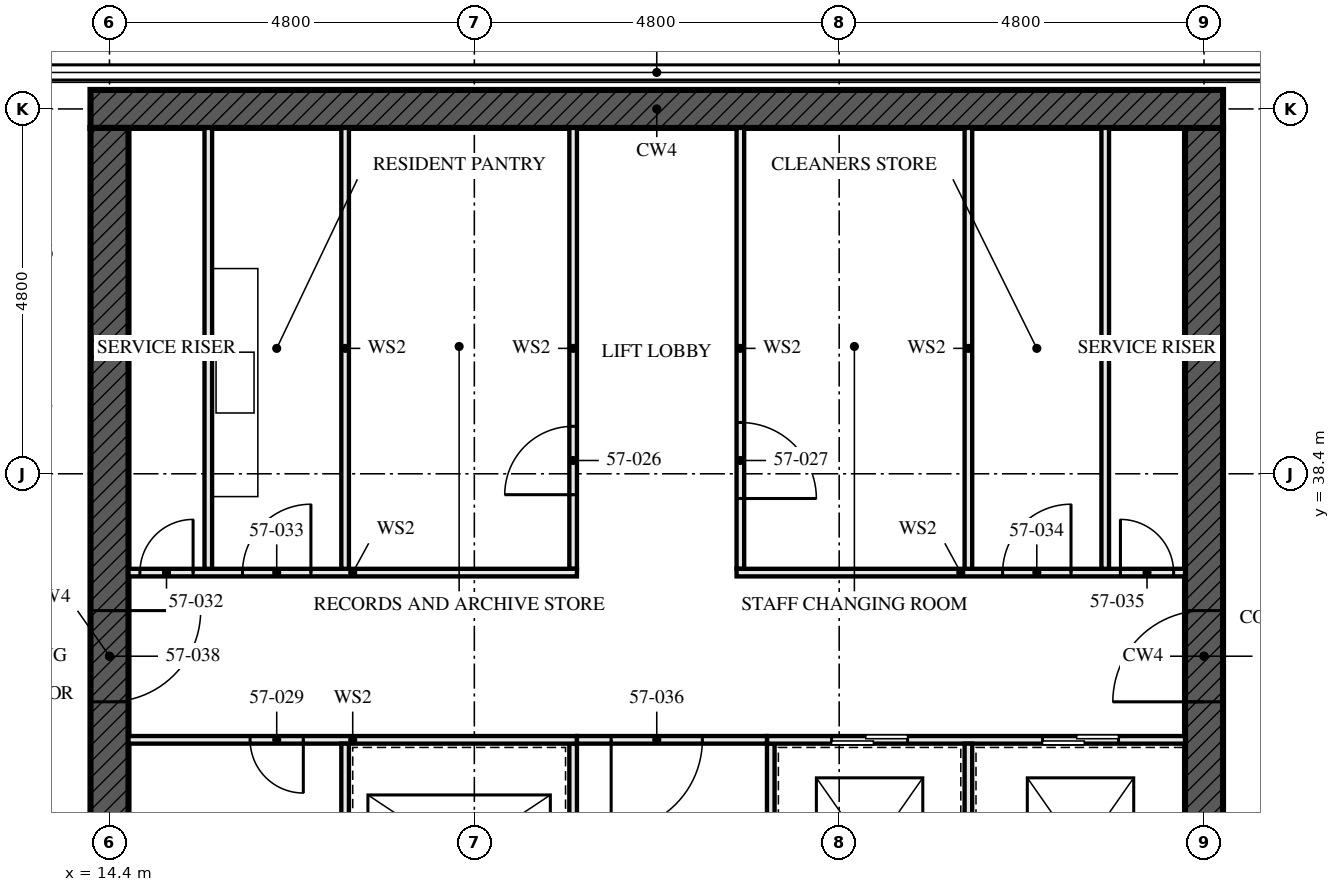
"""IFC4 building model, lengths in metres.
Left out: names, types, materials, properties, quantities, classifications, styles, units other than length and angle.
Written with IfcOpenShell. Run it as: python <this file> out.ifc"""

import sys

from ifc_helpers import new_model, si_unit, direction, frame, frame_2d, origin, place, context, subcontext, project, spatial, rectangle, extrude, element, fill, save


model = new_model("IFC4")
c1 = context("Model", 3, precision=1e-05, world=origin(), true_north=direction((0.0, 1.0)))
c2 = subcontext(c1, "Body", "Model", "MODEL_VIEW")
j1 = project(units=[si_unit("LENGTHUNIT", "METRE"), si_unit("PLANEANGLEUNIT", "RADIAN")], contexts=[c1])
p1 = place(None, origin())
s1 = spatial("IfcSite", under=j1, at=p1, CompositionType="ELEMENT")
p2 = place(p1, origin())
s2 = spatial("IfcBuilding", under=s1, at=p2, CompositionType="ELEMENT")
p3 = place(p2, frame((0.0, 0.0, 208.5)))
s3 = spatial("IfcBuildingStorey", under=s2, at=p3, CompositionType="ELEMENT", Elevation=208.5)
p4 = place(p3, frame((29.05, 43.2, -0.17), z_axis=(0.0, 0.0, 1.0), x_axis=(-1.0, 0.0, 0.0)))
e1 = element("IfcWall", 1, at=p4, inside=s3, PredefinedType="SHEAR", context=c2, shape_type="SweptSolid", body=[
    extrude(rectangle(XDim=14.9, YDim=0.5, at=frame_2d((7.45, 0.0))), origin(), (0.0, 0.0, 1.0), 3.5),
])
p5 = place(p3, frame((14.4, 42.95, -0.17), z_axis=(0.0, 0.0, 1.0), x_axis=(0.0, -1.0, 0.0)))
e2 = element("IfcWall", 2, at=p5, inside=s3, PredefinedType="SHEAR", context=c2, shape_type="SweptSolid", body=[
    extrude(rectangle(XDim=13.9, YDim=0.5, at=frame_2d((6.95, 0.0))), origin(), (0.0, 0.0, 1.0), 3.5),
])
p6 = place(p5, frame((6.35, 0.0, 0.17)))
e3 = element("IfcOpeningElement", 3, at=p6, cuts=e2, PredefinedType="OPENING", context=c2, shape_type="SweptSolid", body=[
    extrude(rectangle(XDim=1.2, YDim=2.1, at=frame_2d((0.6, 1.05))), frame((0.0, 0.26, 0.0), z_axis=(0.0, -1.0, 0.0), x_axis=(1.0, 0.0, 0.0)), (0.0, 0.0, 1.0), 0.521),
])
p7 = place(p3, frame((28.8, 29.05, -0.17), z_axis=(0.0, 0.0, 1.0), x_axis=(0.0, 1.0, 0.0)))
e4 = element("IfcWall", 4, at=p7, inside=s3, PredefinedType="SHEAR", context=c2, shape_type="SweptSolid", body=[
    extrude(rectangle(XDim=13.9, YDim=0.5, at=frame_2d((6.95, 0.0))), origin(), (0.0, 0.0, 1.0), 3.5),
])
p8 = place(p7, frame((6.35, 0.0, 0.17)))
e5 = element("IfcOpeningElement", 5, at=p8, cuts=e4, PredefinedType="OPENING", context=c2, shape_type="SweptSolid", body=[
    extrude(rectangle(XDim=1.2, YDim=2.1, at=frame_2d((0.6, 1.05))), frame((0.0, 0.26, 0.0), z_axis=(0.0, -1.0, 0.0), x_axis=(1.0, 0.0, 0.0)), (0.0, 0.0, 1.0), 0.521),
])
for number, where, z_axis, x_axis in (
    (6, (15.7, 37.15, 0.0), (0.0, 0.0, 1.0), (0.0, 1.0, 0.0)),
    (7, (27.5, 37.15, 0.0), (0.0, 0.0, 1.0), (0.0, 1.0, 0.0)),
):
    element("IfcWall", number, at=place(p3, frame(where, z_axis=z_axis, x_axis=x_axis)), inside=s3, PredefinedType="SOLIDWALL", context=c2, shape_type="SweptSolid", body=[
        extrude(rectangle(XDim=5.8, YDim=0.1, at=frame_2d((2.9, 0.0))), origin(), (0.0, 0.0, 1.0), 3.33),
    ])
p9 = place(p3, frame((20.5, 29.05, 0.0), z_axis=(0.0, 0.0, 1.0), x_axis=(0.0, 1.0, 0.0)))
e8 = element("IfcWall", 8, at=p9, inside=s3, PredefinedType="SOLIDWALL", context=c2, shape_type="SweptSolid", body=[
    extrude(rectangle(XDim=5.8, YDim=0.1, at=frame_2d((2.9, 0.0))), origin(), (0.0, 0.0, 1.0), 3.33),
])
p10 = place(p9, frame((0.8, 0.0, 0.0)))
e9 = element("IfcOpeningElement", 9, at=p10, cuts=e8, PredefinedType="OPENING", context=c2, shape_type="SweptSolid", body=[
    extrude(rectangle(XDim=1.1, YDim=2.3, at=frame_2d((0.55, 1.15))), frame((0.0, 0.061, 0.0), z_axis=(0.0, -1.0, 0.0), x_axis=(1.0, 0.0, 0.0)), (0.0, 0.0, 1.0), 0.121),
])
p11 = place(p9, frame((3.775, 0.0, 0.0)))
e10 = element("IfcOpeningElement", 10, at=p11, cuts=e8, PredefinedType="OPENING", context=c2, shape_type="SweptSolid", body=[
    extrude(rectangle(XDim=1.1, YDim=2.3, at=frame_2d((0.55, 1.15))), frame((0.0, 0.061, 0.0), z_axis=(0.0, -1.0, 0.0), x_axis=(1.0, 0.0, 0.0)), (0.0, 0.0, 1.0), 0.121),
])
p12 = place(p3, frame((20.5, 37.15, 0.0), z_axis=(0.0, 0.0, 1.0), x_axis=(0.0, 1.0, 0.0)))
e11 = element("IfcWall", 11, at=p12, inside=s3, PredefinedType="SOLIDWALL", context=c2, shape_type="SweptSolid", body=[
    extrude(rectangle(XDim=5.8, YDim=0.1, at=frame_2d((2.9, 0.0))), origin(), (0.0, 0.0, 1.0), 3.33),
])
p13 = place(p12, frame((0.975, 0.0, 0.0)))
e12 = element("IfcOpeningElement", 12, at=p13, cuts=e11, PredefinedType="OPENING", context=c2, shape_type="SweptSolid", body=[
    extrude(rectangle(XDim=0.9, YDim=2.1, at=frame_2d((0.45, 1.05))), frame((0.0, 0.061, 0.0), z_axis=(0.0, -1.0, 0.0), x_axis=(1.0, 0.0, 0.0)), (0.0, 0.0, 1.0), 0.121),
])
p14 = place(p3, frame((22.7, 37.15, 0.0), z_axis=(0.0, 0.0, 1.0), x_axis=(0.0, 1.0, 0.0)))
e13 = element("IfcWall", 13, at=p14, inside=s3, PredefinedType="SOLIDWALL", context=c2, shape_type="SweptSolid", body=[
    extrude(rectangle(XDim=5.8, YDim=0.1, at=frame_2d((2.9, 0.0))), origin(), (0.0, 0.0, 1.0), 3.33),
])
p15 = place(p14, frame((0.925, 0.0, 0.0)))
e14 = element("IfcOpeningElement", 14, at=p15, cuts=e13, PredefinedType="OPENING", context=c2, shape_type="SweptSolid", body=[
    extrude(rectangle(XDim=1.0, YDim=2.1, at=frame_2d((0.5, 1.05))), frame((0.0, 0.061, 0.0), z_axis=(0.0, -1.0, 0.0), x_axis=(1.0, 0.0, 0.0)), (0.0, 0.0, 1.0), 0.121),
])
p16 = place(p3, frame((23.1, 29.05, 0.0), z_axis=(0.0, 0.0, 1.0), x_axis=(0.0, 1.0, 0.0)))
e15 = element("IfcWall", 15, at=p16, inside=s3, PredefinedType="SOLIDWALL", context=c2, shape_type="SweptSolid", body=[
    extrude(rectangle(XDim=5.8, YDim=0.1, at=frame_2d((2.9, 0.0))), origin(), (0.0, 0.0, 1.0), 3.33),
])
p17 = place(p16, frame((1.0, 0.0, 0.0)))
e16 = element("IfcOpeningElement", 16, at=p17, cuts=e15, PredefinedType="OPENING", context=c2, shape_type="SweptSolid", body=[
    extrude(rectangle(XDim=0.7, YDim=2.1, at=frame_2d((0.35, 1.05))), frame((0.0, 0.061, 0.0), z_axis=(0.0, -1.0, 0.0), x_axis=(1.0, 0.0, 0.0)), (0.0, 0.0, 1.0), 0.121),
])
p18 = place(p3, frame((14.65, 34.9, 0.0), z_axis=(0.0, 0.0, 1.0), x_axis=(1.0, 0.0, 0.0)))
e17 = element("IfcWall", 17, at=p18, inside=s3, PredefinedType="SOLIDWALL", context=c2, shape_type="SweptSolid", body=[
    extrude(rectangle(XDim=5.9, YDim=0.1, at=frame_2d((2.95, 0.0))), origin(), (0.0, 0.0, 1.0), 3.33),
])
p19 = place(p18, frame((1.6, 0.0, 0.0)))
e18 = element("IfcOpeningElement", 18, at=p19, cuts=e17, PredefinedType="OPENING", context=c2, shape_type="SweptSolid", body=[
    extrude(rectangle(XDim=0.7, YDim=2.1, at=frame_2d((0.35, 1.05))), frame((0.0, 0.061, 0.0), z_axis=(0.0, -1.0, 0.0), x_axis=(1.0, 0.0, 0.0)), (0.0, 0.0, 1.0), 0.121),
])
p20 = place(p3, frame((23.05, 34.9, 0.0), z_axis=(0.0, 0.0, 1.0), x_axis=(1.0, 0.0, 0.0)))
e19 = element("IfcWall", 19, at=p20, inside=s3, PredefinedType="SOLIDWALL", context=c2, shape_type="SweptSolid", body=[
    extrude(rectangle(XDim=5.5, YDim=0.1, at=frame_2d((2.75, 0.0))), origin(), (0.0, 0.0, 1.0), 3.33),
])
p21 = place(p20, frame((0.85, 0.0, 0.0)))
e20 = element("IfcOpeningElement", 20, at=p21, cuts=e19, PredefinedType="OPENING", context=c2, shape_type="SweptSolid", body=[
    extrude(rectangle(XDim=1.0, YDim=2.1, at=frame_2d((0.5, 1.05))), frame((0.0, 0.061, 0.0), z_axis=(0.0, -1.0, 0.0), x_axis=(1.0, 0.0, 0.0)), (0.0, 0.0, 1.0), 0.121),
])
p22 = place(p20, frame((3.625, 0.0, 0.0)))
e21 = element("IfcOpeningElement", 21, at=p22, cuts=e19, PredefinedType="OPENING", context=c2, shape_type="SweptSolid", body=[
    extrude(rectangle(XDim=1.0, YDim=2.1, at=frame_2d((0.5, 1.05))), frame((0.0, 0.061, 0.0), z_axis=(0.0, -1.0, 0.0), x_axis=(1.0, 0.0, 0.0)), (0.0, 0.0, 1.0), 0.121),
])
p23 = place(p3, frame((14.65, 37.1, 0.0), z_axis=(0.0, 0.0, 1.0), x_axis=(1.0, 0.0, 0.0)))
e22 = element("IfcWall", 22, at=p23, inside=s3, PredefinedType="SOLIDWALL", context=c2, shape_type="SweptSolid", body=[
    extrude(rectangle(XDim=5.9, YDim=0.1, at=frame_2d((2.95, 0.0))), origin(), (0.0, 0.0, 1.0), 3.33),
])
p24 = place(p23, frame((0.15, 0.0, 0.0)))
e23 = element("IfcOpeningElement", 23, at=p24, cuts=e22, PredefinedType="OPENING", context=c2, shape_type="SweptSolid", body=[
    extrude(rectangle(XDim=0.7, YDim=2.1, at=frame_2d((0.35, 1.05))), frame((0.0, 0.061, 0.0), z_axis=(0.0, -1.0, 0.0), x_axis=(1.0, 0.0, 0.0)), (0.0, 0.0, 1.0), 0.121),
])
p25 = place(p23, frame((1.5, 0.0, 0.0)))
e24 = element("IfcOpeningElement", 24, at=p25, cuts=e22, PredefinedType="OPENING", context=c2, shape_type="SweptSolid", body=[
    extrude(rectangle(XDim=0.9, YDim=2.1, at=frame_2d((0.45, 1.05))), frame((0.0, 0.061, 0.0), z_axis=(0.0, -1.0, 0.0), x_axis=(1.0, 0.0, 0.0)), (0.0, 0.0, 1.0), 0.121),
])
p26 = place(p3, frame((22.65, 37.1, 0.0), z_axis=(0.0, 0.0, 1.0), x_axis=(1.0, 0.0, 0.0)))
e25 = element("IfcWall", 25, at=p26, inside=s3, PredefinedType="SOLIDWALL", context=c2, shape_type="SweptSolid", body=[
    extrude(rectangle(XDim=5.9, YDim=0.1, at=frame_2d((2.95, 0.0))), origin(), (0.0, 0.0, 1.0), 3.33),
])
p27 = place(p26, frame((3.5, 0.0, 0.0)))
e26 = element("IfcOpeningElement", 26, at=p27, cuts=e25, PredefinedType="OPENING", context=c2, shape_type="SweptSolid", body=[
    extrude(rectangle(XDim=0.9, YDim=2.1, at=frame_2d((0.45, 1.05))), frame((0.0, 0.061, 0.0), z_axis=(0.0, -1.0, 0.0), x_axis=(1.0, 0.0, 0.0)), (0.0, 0.0, 1.0), 0.121),
])
p28 = place(p26, frame((5.05, 0.0, 0.0)))
e27 = element("IfcOpeningElement", 27, at=p28, cuts=e25, PredefinedType="OPENING", context=c2, shape_type="SweptSolid", body=[
    extrude(rectangle(XDim=0.7, YDim=2.1, at=frame_2d((0.35, 1.05))), frame((0.0, 0.061, 0.0), z_axis=(0.0, -1.0, 0.0), x_axis=(1.0, 0.0, 0.0)), (0.0, 0.0, 1.0), 0.121),
])
p29 = place(p3, frame((20.55, 34.9, 0.0), z_axis=(0.0, 0.0, 1.0), x_axis=(1.0, 0.0, 0.0)))
e28 = element("IfcWall", 28, at=p29, inside=s3, PredefinedType="SOLIDWALL", context=c2, shape_type="SweptSolid", body=[
    extrude(rectangle(XDim=2.5, YDim=0.1, at=frame_2d((1.25, 0.0))), origin(), (0.0, 0.0, 1.0), 3.33),
])
p30 = place(p29, frame((0.45, 0.0, 0.0)))
e29 = element("IfcOpeningElement", 29, at=p30, cuts=e28, PredefinedType="OPENING", context=c2, shape_type="SweptSolid", body=[
    extrude(rectangle(XDim=1.2, YDim=2.1, at=frame_2d((0.6, 1.05))), frame((0.0, 0.061, 0.0), z_axis=(0.0, -1.0, 0.0), x_axis=(1.0, 0.0, 0.0)), (0.0, 0.0, 1.0), 0.121),
])
for number, where, z_axis, x_axis in (
    (30, (17.5, 29.05, 0.0), (0.0, 0.0, 1.0), (0.0, 1.0, 0.0)),
    (31, (17.5, 37.15, 0.0), (0.0, 0.0, 1.0), (0.0, 1.0, 0.0)),
    (32, (25.7, 37.15, 0.0), (0.0, 0.0, 1.0), (0.0, 1.0, 0.0)),
):
    element("IfcWall", number, at=place(p3, frame(where, z_axis=z_axis, x_axis=x_axis)), inside=s3, PredefinedType="SOLIDWALL", context=c2, shape_type="SweptSolid", body=[
        extrude(rectangle(XDim=5.8, YDim=0.1, at=frame_2d((2.9, 0.0))), origin(), (0.0, 0.0, 1.0), 3.33),
    ])
p31 = place(p3, frame((25.7, 31.95, 0.0), z_axis=(0.0, 0.0, 1.0), x_axis=(0.0, 1.0, 0.0)))
e33 = element("IfcWall", 33, at=p31, inside=s3, PredefinedType="SOLIDWALL", context=c2, shape_type="SweptSolid", body=[
    extrude(rectangle(XDim=2.9, YDim=0.1, at=frame_2d((1.45, 0.0))), origin(), (0.0, 0.0, 1.0), 3.33),
])
p32 = place(p13, origin())
e34 = element("IfcDoor", 34, at=p32, inside=s3, OperationType="SINGLE_SWING_RIGHT", PredefinedType="DOOR", context=c2, shape_type="SweptSolid", body=[
    extrude(rectangle(XDim=0.9, YDim=2.1, at=frame_2d((0.45, 1.05))), frame((0.0, 0.027, 0.0), z_axis=(0.0, -1.0, 0.0), x_axis=(1.0, 0.0, 0.0)), (0.0, 0.0, 1.0), 0.054),
])
fill(e12, e34)
p33 = place(p15, frame((1.0, 0.0, 0.0), z_axis=(0.0, 0.0, 1.0), x_axis=(-1.0, 0.0, 0.0)))
e35 = element("IfcDoor", 35, at=p33, inside=s3, OperationType="SINGLE_SWING_LEFT", PredefinedType="DOOR", context=c2, shape_type="SweptSolid", body=[
    extrude(rectangle(XDim=1.0, YDim=2.1, at=frame_2d((0.5, 1.05))), frame((0.0, 0.027, 0.0), z_axis=(0.0, -1.0, 0.0), x_axis=(1.0, 0.0, 0.0)), (0.0, 0.0, 1.0), 0.054),
])
fill(e14, e35)
p34 = place(p19, frame((0.7, 0.0, 0.0), z_axis=(0.0, 0.0, 1.0), x_axis=(-1.0, 0.0, 0.0)))
e36 = element("IfcDoor", 36, at=p34, inside=s3, OperationType="SINGLE_SWING_RIGHT", PredefinedType="DOOR", context=c2, shape_type="SweptSolid", body=[
    extrude(rectangle(XDim=0.7, YDim=2.1, at=frame_2d((0.35, 1.05))), frame((0.0, 0.027, 0.0), z_axis=(0.0, -1.0, 0.0), x_axis=(1.0, 0.0, 0.0)), (0.0, 0.0, 1.0), 0.054),
])
fill(e18, e36)
p35 = place(p21, origin())
e37 = element("IfcDoor", 37, at=p35, inside=s3, OperationType="SLIDING_TO_LEFT", PredefinedType="DOOR", context=c2, shape_type="SweptSolid", body=[
    extrude(rectangle(XDim=1.0, YDim=2.1, at=frame_2d((0.5, 1.05))), frame((0.0, 0.05, 0.0), z_axis=(0.0, -1.0, 0.0), x_axis=(1.0, 0.0, 0.0)), (0.0, 0.0, 1.0), 0.1),
])
fill(e20, e37)
p36 = place(p22, origin())
e38 = element("IfcDoor", 38, at=p36, inside=s3, OperationType="SLIDING_TO_LEFT", PredefinedType="DOOR", context=c2, shape_type="SweptSolid", body=[
    extrude(rectangle(XDim=1.0, YDim=2.1, at=frame_2d((0.5, 1.05))), frame((0.0, 0.05, 0.0), z_axis=(0.0, -1.0, 0.0), x_axis=(1.0, 0.0, 0.0)), (0.0, 0.0, 1.0), 0.1),
])
fill(e21, e38)
p37 = place(p24, origin())
e39 = element("IfcDoor", 39, at=p37, inside=s3, OperationType="SINGLE_SWING_LEFT", PredefinedType="DOOR", context=c2, shape_type="SweptSolid", body=[
    extrude(rectangle(XDim=0.7, YDim=2.1, at=frame_2d((0.35, 1.05))), frame((0.0, 0.027, 0.0), z_axis=(0.0, -1.0, 0.0), x_axis=(1.0, 0.0, 0.0)), (0.0, 0.0, 1.0), 0.054),
])
fill(e23, e39)
p38 = place(p25, origin())
e40 = element("IfcDoor", 40, at=p38, inside=s3, OperationType="SINGLE_SWING_LEFT", PredefinedType="DOOR", context=c2, shape_type="SweptSolid", body=[
    extrude(rectangle(XDim=0.9, YDim=2.1, at=frame_2d((0.45, 1.05))), frame((0.0, 0.027, 0.0), z_axis=(0.0, -1.0, 0.0), x_axis=(1.0, 0.0, 0.0)), (0.0, 0.0, 1.0), 0.054),
])
fill(e24, e40)
p39 = place(p27, origin())
e41 = element("IfcDoor", 41, at=p39, inside=s3, OperationType="SINGLE_SWING_LEFT", PredefinedType="DOOR", context=c2, shape_type="SweptSolid", body=[
    extrude(rectangle(XDim=0.9, YDim=2.1, at=frame_2d((0.45, 1.05))), frame((0.0, 0.027, 0.0), z_axis=(0.0, -1.0, 0.0), x_axis=(1.0, 0.0, 0.0)), (0.0, 0.0, 1.0), 0.054),
])
fill(e26, e41)
p40 = place(p28, origin())
e42 = element("IfcDoor", 42, at=p40, inside=s3, OperationType="SINGLE_SWING_RIGHT", PredefinedType="DOOR", context=c2, shape_type="SweptSolid", body=[
    extrude(rectangle(XDim=0.7, YDim=2.1, at=frame_2d((0.35, 1.05))), frame((0.0, 0.027, 0.0), z_axis=(0.0, -1.0, 0.0), x_axis=(1.0, 0.0, 0.0)), (0.0, 0.0, 1.0), 0.054),
])
fill(e27, e42)
p41 = place(p30, frame((1.2, 0.0, 0.0), z_axis=(0.0, 0.0, 1.0), x_axis=(-1.0, 0.0, 0.0)))
e43 = element("IfcDoor", 43, at=p41, inside=s3, OperationType="SINGLE_SWING_LEFT", PredefinedType="DOOR", context=c2, shape_type="SweptSolid", body=[
    extrude(rectangle(XDim=1.2, YDim=2.1, at=frame_2d((0.6, 1.05))), frame((0.0, 0.027, 0.0), z_axis=(0.0, -1.0, 0.0), x_axis=(1.0, 0.0, 0.0)), (0.0, 0.0, 1.0), 0.054),
])
fill(e29, e43)
p42 = place(p6, origin())
e44 = element("IfcDoor", 44, at=p42, inside=s3, OperationType="SINGLE_SWING_LEFT", PredefinedType="DOOR", context=c2, shape_type="SweptSolid", body=[
    extrude(rectangle(XDim=1.2, YDim=2.1, at=frame_2d((0.6, 1.05))), frame((0.0, 0.027, 0.0), z_axis=(0.0, -1.0, 0.0), x_axis=(1.0, 0.0, 0.0)), (0.0, 0.0, 1.0), 0.054),
])
fill(e3, e44)
p43 = place(p8, origin())
e45 = element("IfcDoor", 45, at=p43, inside=s3, OperationType="SINGLE_SWING_LEFT", PredefinedType="DOOR", context=c2, shape_type="SweptSolid", body=[
    extrude(rectangle(XDim=1.2, YDim=2.1, at=frame_2d((0.6, 1.05))), frame((0.0, 0.027, 0.0), z_axis=(0.0, -1.0, 0.0), x_axis=(1.0, 0.0, 0.0)), (0.0, 0.0, 1.0), 0.054),
])
fill(e5, e45)
save(model, sys.argv[1])
